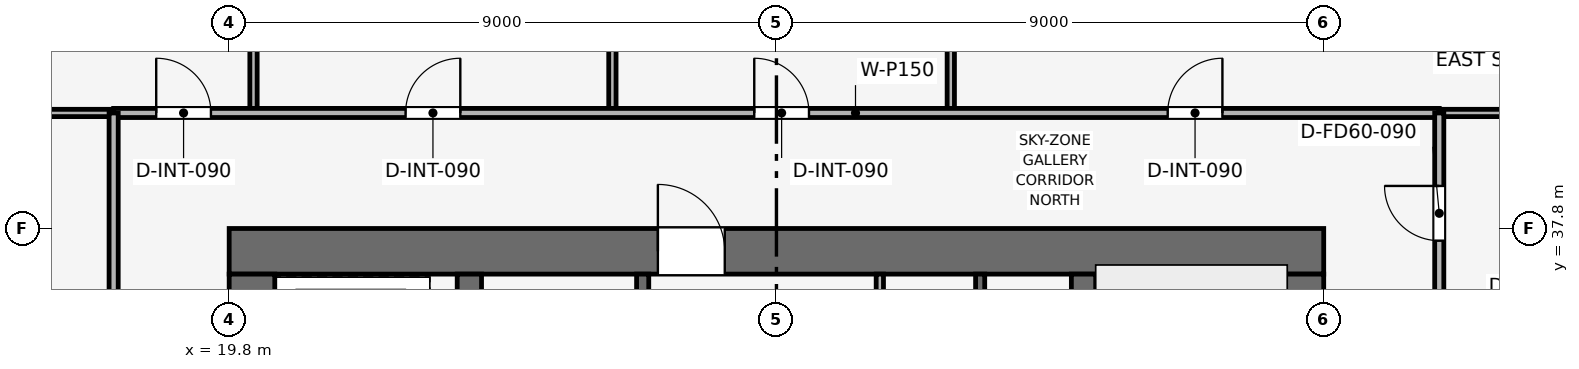
"""IFC4 building model, lengths in metres.
Left out: names, types, materials, properties, quantities, classifications, styles, units other than length and angle.
Written with IfcOpenShell. Run it as: python <this file> out.ifc"""

import sys

from ifc_helpers import new_model, si_unit, direction, frame, frame_2d, origin, place, context, subcontext, project, spatial, rectangle, extrude, element, fill, save


model = new_model("IFC4")
c1 = context("Model", 3, precision=1e-05, world=origin(), true_north=direction((0.0, 1.0)))
c2 = subcontext(c1, "Body", "Model", "MODEL_VIEW")
j1 = project(units=[si_unit("LENGTHUNIT", "METRE"), si_unit("PLANEANGLEUNIT", "RADIAN")], contexts=[c1])
p1 = place(None, origin())
s1 = spatial("IfcSite", under=j1, at=p1, CompositionType="ELEMENT")
p2 = place(p1, origin())
s2 = spatial("IfcBuilding", under=s1, at=p2, CompositionType="ELEMENT")
p3 = place(p2, frame((0.0, 0.0, 254.1)))
s3 = spatial("IfcBuildingStorey", under=s2, at=p3, CompositionType="ELEMENT", Elevation=254.1)
p4 = place(p3, frame((19.8, 37.425, 0.0), z_axis=(0.0, 0.0, 1.0), x_axis=(1.0, 0.0, 0.0)))
e1 = element("IfcWall", 1, at=p4, inside=s3, PredefinedType="SHEAR", context=c2, shape_type="SweptSolid", body=[
    extrude(rectangle(XDim=18.0, YDim=0.75, at=frame_2d((9.0, 0.0))), origin(), (0.0, 0.0, 1.0), 3.75),
])
p5 = place(p4, frame((7.05, 0.0, 0.0)))
e2 = element("IfcOpeningElement", 2, at=p5, cuts=e1, PredefinedType="OPENING", context=c2, shape_type="SweptSolid", body=[
    extrude(rectangle(XDim=1.1, YDim=2.15, at=frame_2d((0.55, 1.075))), frame((0.0, 0.385, 0.0), z_axis=(0.0, -1.0, 0.0), x_axis=(1.0, 0.0, 0.0)), (0.0, 0.0, 1.0), 0.77),
])
p6 = place(p3, frame((20.175, 20.55, 0.0), z_axis=(0.0, 0.0, 1.0), x_axis=(0.0, 1.0, 0.0)))
e3 = element("IfcWall", 3, at=p6, inside=s3, PredefinedType="SHEAR", context=c2, shape_type="SweptSolid", body=[
    extrude(rectangle(XDim=16.5, YDim=0.75, at=frame_2d((8.25, 0.0))), origin(), (0.0, 0.0, 1.0), 3.75),
])
p7 = place(p6, frame((10.25, 0.0, 0.0)))
e4 = element("IfcOpeningElement", 4, at=p7, cuts=e3, PredefinedType="OPENING", context=c2, shape_type="SweptSolid", body=[
    extrude(rectangle(XDim=1.1, YDim=2.15, at=frame_2d((0.55, 1.075))), frame((0.0, 0.385, 0.0), z_axis=(0.0, -1.0, 0.0), x_axis=(1.0, 0.0, 0.0)), (0.0, 0.0, 1.0), 0.77),
])
p8 = place(p3, frame((37.425, 20.55, 0.0), z_axis=(0.0, 0.0, 1.0), x_axis=(0.0, 1.0, 0.0)))
e5 = element("IfcWall", 5, at=p8, inside=s3, PredefinedType="SHEAR", context=c2, shape_type="SweptSolid", body=[
    extrude(rectangle(XDim=16.5, YDim=0.75, at=frame_2d((8.25, 0.0))), origin(), (0.0, 0.0, 1.0), 3.75),
])
p9 = place(p8, frame((4.75, 0.0, 0.0)))
e6 = element("IfcOpeningElement", 6, at=p9, cuts=e5, PredefinedType="OPENING", context=c2, shape_type="SweptSolid", body=[
    extrude(rectangle(XDim=1.1, YDim=2.15, at=frame_2d((0.55, 1.075))), frame((0.0, 0.385, 0.0), z_axis=(0.0, -1.0, 0.0), x_axis=(1.0, 0.0, 0.0)), (0.0, 0.0, 1.0), 0.77),
])
for number, where, z_axis, x_axis in (
    (7, (23.75, 20.55, 0.0), (0.0, 0.0, 1.0), (0.0, 1.0, 0.0)),
    (8, (33.85, 20.55, 0.0), (0.0, 0.0, 1.0), (0.0, 1.0, 0.0)),
):
    element("IfcWall", number, at=place(p3, frame(where, z_axis=z_axis, x_axis=x_axis)), inside=s3, PredefinedType="SHEAR", context=c2, shape_type="SweptSolid", body=[
        extrude(rectangle(XDim=16.5, YDim=0.4, at=frame_2d((8.25, 0.0))), origin(), (0.0, 0.0, 1.0), 3.75),
    ])
p10 = place(p3, frame((32.15, 34.0, 0.0), z_axis=(0.0, 0.0, 1.0), x_axis=(0.0, 1.0, 0.0)))
e9 = element("IfcWall", 9, at=p10, inside=s3, PredefinedType="SHEAR", context=c2, shape_type="SweptSolid", body=[
    extrude(rectangle(XDim=3.05, YDim=0.15, at=frame_2d((1.525, 0.0))), origin(), (0.0, 0.0, 1.0), 3.5),
])
p11 = place(p3, frame((26.6, 34.0, 0.0), z_axis=(0.0, 0.0, 1.0), x_axis=(0.0, 1.0, 0.0)))
e10 = element("IfcWall", 10, at=p11, inside=s3, PredefinedType="SHEAR", context=c2, shape_type="SweptSolid", body=[
    extrude(rectangle(XDim=3.05, YDim=0.2, at=frame_2d((1.525, 0.0))), origin(), (0.0, 0.0, 1.0), 3.5),
])
p12 = place(p11, frame((0.75, 0.0, 0.0)))
e11 = element("IfcOpeningElement", 11, at=p12, cuts=e10, PredefinedType="OPENING", context=c2, shape_type="SweptSolid", body=[
    extrude(rectangle(XDim=1.1, YDim=2.15, at=frame_2d((0.55, 1.075))), frame((0.0, 0.11, 0.0), z_axis=(0.0, -1.0, 0.0), x_axis=(1.0, 0.0, 0.0)), (0.0, 0.0, 1.0), 0.22),
])
p13 = place(p3, frame((30.5, 33.925, 0.0), z_axis=(0.0, 0.0, 1.0), x_axis=(0.0, 1.0, 0.0)))
e12 = element("IfcWall", 12, at=p13, inside=s3, PredefinedType="PARTITIONING", context=c2, shape_type="SweptSolid", body=[
    extrude(rectangle(XDim=3.125, YDim=0.12, at=frame_2d((1.562, 0.0))), origin(), (0.0, 0.0, 1.0), 3.5),
])
p14 = place(p13, frame((0.85, 0.0, 0.0)))
e13 = element("IfcOpeningElement", 13, at=p14, cuts=e12, PredefinedType="OPENING", context=c2, shape_type="SweptSolid", body=[
    extrude(rectangle(XDim=0.9, YDim=2.1, at=frame_2d((0.45, 1.05))), frame((0.0, 0.07, 0.0), z_axis=(0.0, -1.0, 0.0), x_axis=(1.0, 0.0, 0.0)), (0.0, 0.0, 1.0), 0.14),
])
for number, where, z_axis, x_axis in (
    (14, (20.2, 39.7, 0.0), (0.0, 0.0, 1.0), (0.0, 1.0, 0.0)),
    (15, (26.102, 39.7, 0.0), (0.0, 0.0, 1.0), (0.0, 1.0, 0.0)),
    (16, (31.667, 39.7, 0.0), (0.0, 0.0, 1.0), (0.0, 1.0, 0.0)),
):
    element("IfcWall", number, at=place(p3, frame(where, z_axis=z_axis, x_axis=x_axis)), inside=s3, PredefinedType="PARTITIONING", context=c2, shape_type="SweptSolid", body=[
        extrude(rectangle(XDim=13.87, YDim=0.12, at=frame_2d((6.935, 0.0))), origin(), (0.0, 0.0, 1.0), 3.085),
    ])
p15 = place(p3, frame((4.03, 39.7, 0.0), z_axis=(0.0, 0.0, 1.0), x_axis=(1.0, 0.0, 0.0)))
e17 = element("IfcWall", 17, at=p15, inside=s3, PredefinedType="PARTITIONING", context=c2, shape_type="SweptSolid", body=[
    extrude(rectangle(XDim=13.87, YDim=0.12, at=frame_2d((6.935, 0.0))), origin(), (0.0, 0.0, 1.0), 3.085),
])
p16 = place(p3, frame((39.7, 39.7, 0.0), z_axis=(0.0, 0.0, 1.0), x_axis=(1.0, 0.0, 0.0)))
e18 = element("IfcWall", 18, at=p16, inside=s3, PredefinedType="PARTITIONING", context=c2, shape_type="SweptSolid", body=[
    extrude(rectangle(XDim=13.87, YDim=0.12, at=frame_2d((6.935, 0.0))), origin(), (0.0, 0.0, 1.0), 3.085),
])
p17 = place(p3, frame((17.9, 39.7, 0.0), z_axis=(0.0, 0.0, 1.0), x_axis=(1.0, 0.0, 0.0)))
e19 = element("IfcWall", 19, at=p17, inside=s3, PredefinedType="PARTITIONING", context=c2, shape_type="SweptSolid", body=[
    extrude(rectangle(XDim=21.8, YDim=0.15, at=frame_2d((10.9, 0.0))), origin(), (0.0, 0.0, 1.0), 3.085),
])
p18 = place(p17, frame((0.7, 0.0, 0.0)))
e20 = element("IfcOpeningElement", 20, at=p18, cuts=e19, PredefinedType="OPENING", context=c2, shape_type="SweptSolid", body=[
    extrude(rectangle(XDim=0.9, YDim=2.1, at=frame_2d((0.45, 1.05))), frame((0.0, 0.085, 0.0), z_axis=(0.0, -1.0, 0.0), x_axis=(1.0, 0.0, 0.0)), (0.0, 0.0, 1.0), 0.17),
])
p19 = place(p17, frame((4.801, 0.0, 0.0)))
e21 = element("IfcOpeningElement", 21, at=p19, cuts=e19, PredefinedType="OPENING", context=c2, shape_type="SweptSolid", body=[
    extrude(rectangle(XDim=0.9, YDim=2.1, at=frame_2d((0.45, 1.05))), frame((0.0, 0.085, 0.0), z_axis=(0.0, -1.0, 0.0), x_axis=(1.0, 0.0, 0.0)), (0.0, 0.0, 1.0), 0.17),
])
p20 = place(p17, frame((10.535, 0.0, 0.0)))
e22 = element("IfcOpeningElement", 22, at=p20, cuts=e19, PredefinedType="OPENING", context=c2, shape_type="SweptSolid", body=[
    extrude(rectangle(XDim=0.9, YDim=2.1, at=frame_2d((0.45, 1.05))), frame((0.0, 0.085, 0.0), z_axis=(0.0, -1.0, 0.0), x_axis=(1.0, 0.0, 0.0)), (0.0, 0.0, 1.0), 0.17),
])
p21 = place(p17, frame((17.334, 0.0, 0.0)))
e23 = element("IfcOpeningElement", 23, at=p21, cuts=e19, PredefinedType="OPENING", context=c2, shape_type="SweptSolid", body=[
    extrude(rectangle(XDim=0.9, YDim=2.1, at=frame_2d((0.45, 1.05))), frame((0.0, 0.085, 0.0), z_axis=(0.0, -1.0, 0.0), x_axis=(1.0, 0.0, 0.0)), (0.0, 0.0, 1.0), 0.17),
])
p22 = place(p3, frame((17.9, 10.8, 0.0), z_axis=(0.0, 0.0, 1.0), x_axis=(0.0, 1.0, 0.0)))
e24 = element("IfcWall", 24, at=p22, inside=s3, PredefinedType="PARTITIONING", context=c2, shape_type="SweptSolid", body=[
    extrude(rectangle(XDim=28.9, YDim=0.15, at=frame_2d((14.45, 0.0))), origin(), (0.0, 0.0, 1.0), 3.085),
])
p23 = place(p22, frame((0.7, 0.0, 0.0)))
e25 = element("IfcOpeningElement", 25, at=p23, cuts=e24, PredefinedType="OPENING", context=c2, shape_type="SweptSolid", body=[
    extrude(rectangle(XDim=0.9, YDim=2.1, at=frame_2d((0.45, 1.05))), frame((0.0, 0.085, 0.0), z_axis=(0.0, -1.0, 0.0), x_axis=(1.0, 0.0, 0.0)), (0.0, 0.0, 1.0), 0.17),
])
p24 = place(p22, frame((7.828, 0.0, 0.0)))
e26 = element("IfcOpeningElement", 26, at=p24, cuts=e24, PredefinedType="OPENING", context=c2, shape_type="SweptSolid", body=[
    extrude(rectangle(XDim=0.9, YDim=2.1, at=frame_2d((0.45, 1.05))), frame((0.0, 0.085, 0.0), z_axis=(0.0, -1.0, 0.0), x_axis=(1.0, 0.0, 0.0)), (0.0, 0.0, 1.0), 0.17),
])
p25 = place(p22, frame((21.127, 0.0, 0.0)))
e27 = element("IfcOpeningElement", 27, at=p25, cuts=e24, PredefinedType="OPENING", context=c2, shape_type="SweptSolid", body=[
    extrude(rectangle(XDim=0.9, YDim=2.1, at=frame_2d((0.45, 1.05))), frame((0.0, 0.085, 0.0), z_axis=(0.0, -1.0, 0.0), x_axis=(1.0, 0.0, 0.0)), (0.0, 0.0, 1.0), 0.17),
])
p26 = place(p3, frame((39.7, 24.4, 0.0), z_axis=(0.0, 0.0, 1.0), x_axis=(0.0, 1.0, 0.0)))
e28 = element("IfcWall", 28, at=p26, inside=s3, PredefinedType="PARTITIONING", context=c2, shape_type="SweptSolid", body=[
    extrude(rectangle(XDim=15.3, YDim=0.15, at=frame_2d((7.65, 0.0))), origin(), (0.0, 0.0, 1.0), 3.085),
])
p27 = place(p26, frame((1.35, 0.0, 0.0)))
e29 = element("IfcOpeningElement", 29, at=p27, cuts=e28, PredefinedType="OPENING", context=c2, shape_type="SweptSolid", body=[
    extrude(rectangle(XDim=0.9, YDim=2.1, at=frame_2d((0.45, 1.05))), frame((0.0, 0.085, 0.0), z_axis=(0.0, -1.0, 0.0), x_axis=(1.0, 0.0, 0.0)), (0.0, 0.0, 1.0), 0.17),
])
p28 = place(p26, frame((4.55, 0.0, 0.0)))
e30 = element("IfcOpeningElement", 30, at=p28, cuts=e28, PredefinedType="OPENING", context=c2, shape_type="SweptSolid", body=[
    extrude(rectangle(XDim=0.9, YDim=2.1, at=frame_2d((0.45, 1.05))), frame((0.0, 0.085, 0.0), z_axis=(0.0, -1.0, 0.0), x_axis=(1.0, 0.0, 0.0)), (0.0, 0.0, 1.0), 0.17),
])
p29 = place(p26, frame((7.45, 0.0, 0.0)))
e31 = element("IfcOpeningElement", 31, at=p29, cuts=e28, PredefinedType="OPENING", context=c2, shape_type="SweptSolid", body=[
    extrude(rectangle(XDim=0.9, YDim=2.1, at=frame_2d((0.45, 1.05))), frame((0.0, 0.085, 0.0), z_axis=(0.0, -1.0, 0.0), x_axis=(1.0, 0.0, 0.0)), (0.0, 0.0, 1.0), 0.17),
])
p30 = place(p26, frame((10.2, 0.0, 0.0)))
e32 = element("IfcOpeningElement", 32, at=p30, cuts=e28, PredefinedType="OPENING", context=c2, shape_type="SweptSolid", body=[
    extrude(rectangle(XDim=0.95, YDim=2.1, at=frame_2d((0.475, 1.05))), frame((0.0, 0.085, 0.0), z_axis=(0.0, -1.0, 0.0), x_axis=(1.0, 0.0, 0.0)), (0.0, 0.0, 1.0), 0.17),
])
p31 = place(p26, frame((13.2, 0.0, 0.0)))
e33 = element("IfcOpeningElement", 33, at=p31, cuts=e28, PredefinedType="OPENING", context=c2, shape_type="SweptSolid", body=[
    extrude(rectangle(XDim=0.9, YDim=2.1, at=frame_2d((0.45, 1.05))), frame((0.0, 0.085, 0.0), z_axis=(0.0, -1.0, 0.0), x_axis=(1.0, 0.0, 0.0)), (0.0, 0.0, 1.0), 0.17),
])
p32 = place(p18, origin())
e34 = element("IfcDoor", 34, at=p32, inside=s3, OperationType="SINGLE_SWING_LEFT", PredefinedType="DOOR", context=c2, shape_type="SweptSolid", body=[
    extrude(rectangle(XDim=0.9, YDim=2.1, at=frame_2d((0.45, 1.05))), frame((0.0, 0.025, 0.0), z_axis=(0.0, -1.0, 0.0), x_axis=(1.0, 0.0, 0.0)), (0.0, 0.0, 1.0), 0.05),
])
fill(e20, e34)
p33 = place(p19, origin())
e35 = element("IfcDoor", 35, at=p33, inside=s3, OperationType="SINGLE_SWING_RIGHT", PredefinedType="DOOR", context=c2, shape_type="SweptSolid", body=[
    extrude(rectangle(XDim=0.9, YDim=2.1, at=frame_2d((0.45, 1.05))), frame((0.0, 0.025, 0.0), z_axis=(0.0, -1.0, 0.0), x_axis=(1.0, 0.0, 0.0)), (0.0, 0.0, 1.0), 0.05),
])
fill(e21, e35)
p34 = place(p20, origin())
e36 = element("IfcDoor", 36, at=p34, inside=s3, OperationType="SINGLE_SWING_LEFT", PredefinedType="DOOR", context=c2, shape_type="SweptSolid", body=[
    extrude(rectangle(XDim=0.9, YDim=2.1, at=frame_2d((0.45, 1.05))), frame((0.0, 0.025, 0.0), z_axis=(0.0, -1.0, 0.0), x_axis=(1.0, 0.0, 0.0)), (0.0, 0.0, 1.0), 0.05),
])
fill(e22, e36)
p35 = place(p21, origin())
e37 = element("IfcDoor", 37, at=p35, inside=s3, OperationType="SINGLE_SWING_RIGHT", PredefinedType="DOOR", context=c2, shape_type="SweptSolid", body=[
    extrude(rectangle(XDim=0.9, YDim=2.1, at=frame_2d((0.45, 1.05))), frame((0.0, 0.025, 0.0), z_axis=(0.0, -1.0, 0.0), x_axis=(1.0, 0.0, 0.0)), (0.0, 0.0, 1.0), 0.05),
])
fill(e23, e37)
p36 = place(p31, origin())
e38 = element("IfcDoor", 38, at=p36, inside=s3, OperationType="SINGLE_SWING_RIGHT", PredefinedType="DOOR", context=c2, shape_type="SweptSolid", body=[
    extrude(rectangle(XDim=0.9, YDim=2.1, at=frame_2d((0.45, 1.05))), frame((0.0, 0.025, 0.0), z_axis=(0.0, -1.0, 0.0), x_axis=(1.0, 0.0, 0.0)), (0.0, 0.0, 1.0), 0.05),
])
fill(e33, e38)
p37 = place(p5, origin())
e39 = element("IfcDoor", 39, at=p37, inside=s3, OperationType="SINGLE_SWING_LEFT", PredefinedType="DOOR", context=c2, shape_type="SweptSolid", body=[
    extrude(rectangle(XDim=1.1, YDim=2.15, at=frame_2d((0.55, 1.075))), frame((0.0, 0.025, 0.0), z_axis=(0.0, -1.0, 0.0), x_axis=(1.0, 0.0, 0.0)), (0.0, 0.0, 1.0), 0.05),
])
fill(e2, e39)
save(model, sys.argv[1])
